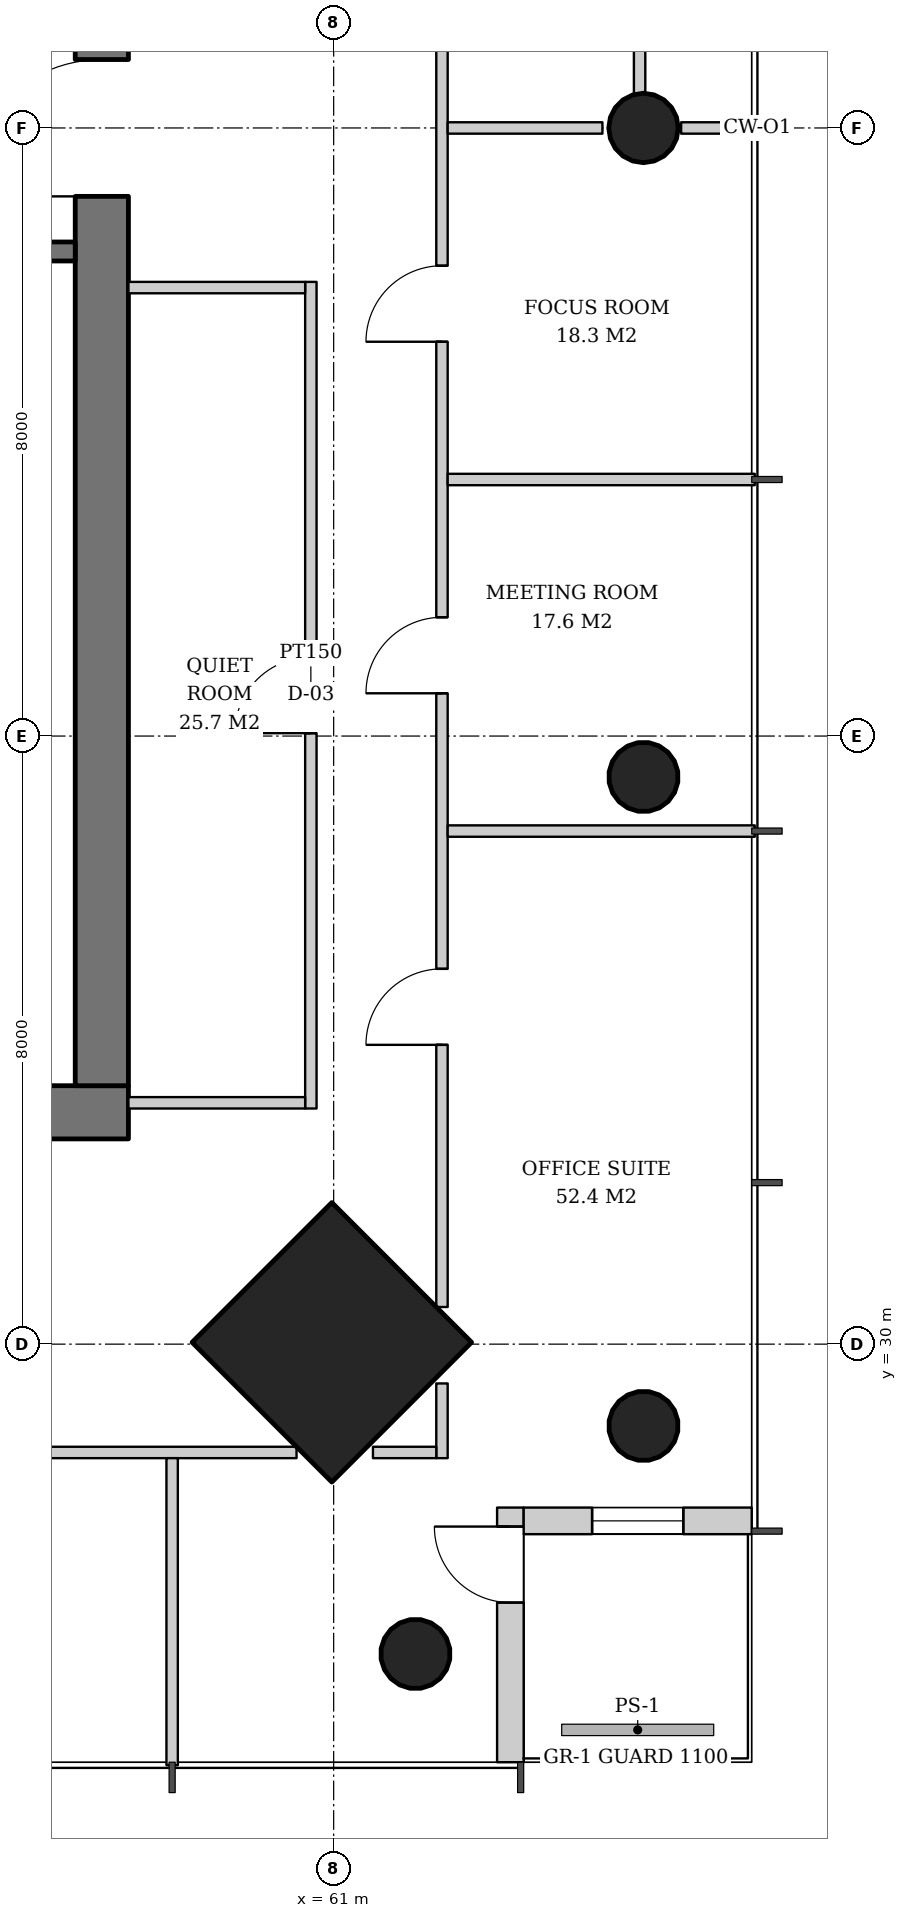
"""IFC4 building model, lengths in metres.
Left out: names, types, materials, properties, quantities, classifications, styles, units other than length and angle.
Written with IfcOpenShell. Run it as: python <this file> out.ifc"""

import sys

from ifc_helpers import new_model, si_unit, direction, frame, frame_2d, origin, origin_2d, place, context, subcontext, project, spatial, rectangle, hollow_circle, extrude, element, fill, save


model = new_model("IFC4")
c1 = context("Model", 3, precision=1e-05, world=origin(), true_north=direction((0.0, 1.0)))
c2 = subcontext(c1, "Body", "Model", "MODEL_VIEW")
j1 = project(units=[si_unit("LENGTHUNIT", "METRE"), si_unit("PLANEANGLEUNIT", "RADIAN")], contexts=[c1])
p1 = place(None, origin())
s1 = spatial("IfcSite", under=j1, at=p1, CompositionType="ELEMENT")
p2 = place(p1, origin())
s2 = spatial("IfcBuilding", under=s1, at=p2, CompositionType="ELEMENT")
p3 = place(p2, frame((0.0, 0.0, 142.6)))
s3 = spatial("IfcBuildingStorey", under=s2, at=p3, CompositionType="ELEMENT", Elevation=142.6)
p4 = place(p3, frame((65.114, 28.886, 0.0), z_axis=(-0.031900153262, 0.031900153262, 0.998981861919), x_axis=(-0.707106781187, -0.707106781187, 0.0)))
e1 = element("IfcColumn", 1, at=p4, inside=s3, PredefinedType="COLUMN", context=c2, shape_type="SweptSolid", body=[
    extrude(hollow_circle(Radius=0.457, WallThickness=0.03, at=origin_2d()), origin(), (0.0, 0.0, 1.0), 3.804),
])
p5 = place(p3, frame((65.114, 37.443, 0.0), z_axis=(-0.031912317206, 0.01598826355, 0.999362786699), x_axis=(-0.447933021895, -0.894067115991, 0.0)))
e2 = element("IfcColumn", 2, at=p5, inside=s3, PredefinedType="COLUMN", context=c2, shape_type="SweptSolid", body=[
    extrude(hollow_circle(Radius=0.457, WallThickness=0.03, at=origin_2d()), origin(), (0.0, 0.0, 1.0), 3.802),
])
p6 = place(p3, frame((65.114, 46.0, 0.0), z_axis=(-0.031916396774, 0.0, 0.999490542035), x_axis=(0.0, -1.0, 0.0)))
e3 = element("IfcColumn", 3, at=p6, inside=s3, PredefinedType="COLUMN", context=c2, shape_type="SweptSolid", body=[
    extrude(hollow_circle(Radius=0.457, WallThickness=0.03, at=origin_2d()), origin(), (0.0, 0.0, 1.0), 3.802),
])
p7 = place(p3, frame((61.014, 29.986, 0.0), z_axis=(-0.031964207655, 0.031964207655, 0.998977766949), x_axis=(-0.707106781187, -0.707106781187, 0.0)))
e4 = element("IfcColumn", 4, at=p7, inside=s3, PredefinedType="COLUMN", context=c2, shape_type="SweptSolid", body=[
    extrude(rectangle(XDim=2.6, YDim=2.6, at=origin_2d()), origin(), (0.0, 0.0, 1.0), 3.804),
])
p8 = place(p3, frame((62.114, 25.886, 0.0), z_axis=(-0.031900153262, 0.031900153262, 0.998981861919), x_axis=(-0.707106781187, -0.707106781187, 0.0)))
e5 = element("IfcColumn", 5, at=p8, inside=s3, PredefinedType="COLUMN", context=c2, shape_type="SweptSolid", body=[
    extrude(hollow_circle(Radius=0.457, WallThickness=0.03, at=origin_2d()), origin(), (0.0, 0.0, 1.0), 3.804),
])
p9 = place(p3, frame((31.7, 33.05, 0.0), z_axis=(0.0, 0.0, 1.0), x_axis=(1.0, 0.0, 0.0)))
e6 = element("IfcWall", 6, at=p9, inside=s3, PredefinedType="SHEAR", context=c2, shape_type="SweptSolid", body=[
    extrude(rectangle(XDim=26.6, YDim=0.7, at=frame_2d((13.3, 0.0))), origin(), (0.0, 0.0, 1.0), 3.8),
])
p10 = place(p9, frame((7.3, 0.0, 0.0)))
e7 = element("IfcOpeningElement", 7, at=p10, cuts=e6, PredefinedType="OPENING", context=c2, shape_type="SweptSolid", body=[
    extrude(rectangle(XDim=1.0, YDim=2.1, at=frame_2d((0.5, 1.05))), frame((0.0, 0.36, 0.0), z_axis=(0.0, -1.0, 0.0), x_axis=(1.0, 0.0, 0.0)), (0.0, 0.0, 1.0), 0.72),
])
p11 = place(p9, frame((18.75, 0.0, 0.0)))
e8 = element("IfcOpeningElement", 8, at=p11, cuts=e6, PredefinedType="OPENING", context=c2, shape_type="SweptSolid", body=[
    extrude(rectangle(XDim=1.0, YDim=2.1, at=frame_2d((0.5, 1.05))), frame((0.0, 0.36, 0.0), z_axis=(0.0, -1.0, 0.0), x_axis=(1.0, 0.0, 0.0)), (0.0, 0.0, 1.0), 0.72),
])
p12 = place(p9, frame((1.85, 0.0, 0.0)))
e9 = element("IfcOpeningElement", 9, at=p12, cuts=e6, PredefinedType="OPENING", context=c2, shape_type="SweptSolid", body=[
    extrude(rectangle(XDim=1.0, YDim=2.1, at=frame_2d((0.5, 1.05))), frame((0.0, 0.36, 0.0), z_axis=(0.0, -1.0, 0.0), x_axis=(1.0, 0.0, 0.0)), (0.0, 0.0, 1.0), 0.72),
])
p13 = place(p9, frame((4.7, 0.0, 0.0)))
e10 = element("IfcOpeningElement", 10, at=p13, cuts=e6, PredefinedType="OPENING", context=c2, shape_type="SweptSolid", body=[
    extrude(rectangle(XDim=1.0, YDim=2.1, at=frame_2d((0.5, 1.05))), frame((0.0, 0.36, 0.0), z_axis=(0.0, -1.0, 0.0), x_axis=(1.0, 0.0, 0.0)), (0.0, 0.0, 1.0), 0.72),
])
p14 = place(p9, frame((12.44, 0.0, 0.0)))
e11 = element("IfcOpeningElement", 11, at=p14, cuts=e6, PredefinedType="OPENING", context=c2, shape_type="SweptSolid", body=[
    extrude(rectangle(XDim=1.0, YDim=2.1, at=frame_2d((0.5, 1.05))), frame((0.0, 0.36, 0.0), z_axis=(0.0, -1.0, 0.0), x_axis=(1.0, 0.0, 0.0)), (0.0, 0.0, 1.0), 0.72),
])
p15 = place(p9, frame((20.644, 0.0, 0.0)))
e12 = element("IfcOpeningElement", 12, at=p15, cuts=e6, PredefinedType="OPENING", context=c2, shape_type="SweptSolid", body=[
    extrude(rectangle(XDim=1.0, YDim=2.1, at=frame_2d((0.5, 1.05))), frame((0.0, 0.36, 0.0), z_axis=(0.0, -1.0, 0.0), x_axis=(1.0, 0.0, 0.0)), (0.0, 0.0, 1.0), 0.72),
])
p16 = place(p9, frame((23.544, 0.0, 0.0)))
e13 = element("IfcOpeningElement", 13, at=p16, cuts=e6, PredefinedType="OPENING", context=c2, shape_type="SweptSolid", body=[
    extrude(rectangle(XDim=1.0, YDim=2.1, at=frame_2d((0.5, 1.05))), frame((0.0, 0.36, 0.0), z_axis=(0.0, -1.0, 0.0), x_axis=(1.0, 0.0, 0.0)), (0.0, 0.0, 1.0), 0.72),
])
p17 = place(p3, frame((57.95, 33.4, 0.0), z_axis=(0.0, 0.0, 1.0), x_axis=(0.0, 1.0, 0.0)))
e14 = element("IfcWall", 14, at=p17, inside=s3, PredefinedType="SHEAR", context=c2, shape_type="SweptSolid", body=[
    extrude(rectangle(XDim=25.2, YDim=0.7, at=frame_2d((12.6, 0.0))), origin(), (0.0, 0.0, 1.0), 3.8),
])
p18 = place(p17, frame((11.7, 0.0, 0.0)))
e15 = element("IfcOpeningElement", 15, at=p18, cuts=e14, PredefinedType="OPENING", context=c2, shape_type="SweptSolid", body=[
    extrude(rectangle(XDim=1.8, YDim=2.4, at=frame_2d((0.9, 1.2))), frame((0.0, 0.36, 0.0), z_axis=(0.0, -1.0, 0.0), x_axis=(1.0, 0.0, 0.0)), (0.0, 0.0, 1.0), 0.72),
])
p19 = place(p3, frame((63.325, 24.5, 0.0), z_axis=(0.0, 0.0, 1.0), x_axis=(0.0, 1.0, 0.0)))
e16 = element("IfcWall", 16, at=p19, inside=s3, PredefinedType="SOLIDWALL", context=c2, shape_type="SweptSolid", body=[
    extrude(rectangle(XDim=3.35, YDim=0.35, at=frame_2d((1.675, 0.0))), origin(), (0.0, 0.0, 1.0), 3.62),
])
p20 = place(p19, frame((2.1, 0.0, 0.0)))
e17 = element("IfcOpeningElement", 17, at=p20, cuts=e16, PredefinedType="OPENING", context=c2, shape_type="SweptSolid", body=[
    extrude(rectangle(XDim=1.0, YDim=2.4, at=frame_2d((0.5, 1.2))), frame((0.0, 0.185, 0.0), z_axis=(0.0, -1.0, 0.0), x_axis=(1.0, 0.0, 0.0)), (0.0, 0.0, 1.0), 0.37),
])
p21 = place(p3, frame((63.5, 27.675, 0.0), z_axis=(0.0, 0.0, 1.0), x_axis=(1.0, 0.0, 0.0)))
e18 = element("IfcWall", 18, at=p21, inside=s3, PredefinedType="SOLIDWALL", context=c2, shape_type="SweptSolid", body=[
    extrude(rectangle(XDim=3.0, YDim=0.35, at=frame_2d((1.5, 0.0))), origin(), (0.0, 0.0, 1.0), 3.62),
])
p22 = place(p21, frame((0.9, 0.0, 0.6)))
e19 = element("IfcOpeningElement", 19, at=p22, cuts=e18, PredefinedType="OPENING", context=c2, shape_type="SweptSolid", body=[
    extrude(rectangle(XDim=1.2, YDim=2.55, at=frame_2d((0.6, 1.275))), frame((0.0, 0.185, 0.0), z_axis=(0.0, -1.0, 0.0), x_axis=(1.0, 0.0, 0.0)), (0.0, 0.0, 1.0), 0.37),
])
p23 = place(p3, frame((54.9, 44.375, 0.0), z_axis=(0.0, 0.0, 1.0), x_axis=(1.0, 0.0, 0.0)))
e20 = element("IfcWall", 20, at=p23, inside=s3, PredefinedType="SOLIDWALL", context=c2, shape_type="SweptSolid", body=[
    extrude(rectangle(XDim=2.7, YDim=0.25, at=frame_2d((1.35, 0.0))), origin(), (0.0, 0.0, 1.0), 3.62),
])
p24 = place(p3, frame((60.7, 33.1, 0.0), z_axis=(0.0, 0.0, 1.0), x_axis=(0.0, 1.0, 0.0)))
e21 = element("IfcWall", 21, at=p24, inside=s3, PredefinedType="PARTITIONING", context=c2, shape_type="SweptSolid", body=[
    extrude(rectangle(XDim=10.875, YDim=0.15, at=frame_2d((5.438, 0.0))), origin(), (0.0, 0.0, 1.0), 2.72),
])
p25 = place(p24, frame((4.938, 0.0, 0.0)))
e22 = element("IfcOpeningElement", 22, at=p25, cuts=e21, PredefinedType="OPENING", context=c2, shape_type="SweptSolid", body=[
    extrude(rectangle(XDim=1.0, YDim=2.1, at=frame_2d((0.5, 1.05))), frame((0.0, 0.085, 0.0), z_axis=(0.0, -1.0, 0.0), x_axis=(1.0, 0.0, 0.0)), (0.0, 0.0, 1.0), 0.17),
])
p26 = place(p3, frame((58.3, 33.175, 0.0), z_axis=(0.0, 0.0, 1.0), x_axis=(1.0, 0.0, 0.0)))
e23 = element("IfcWall", 23, at=p26, inside=s3, PredefinedType="PARTITIONING", context=c2, shape_type="SweptSolid", body=[
    extrude(rectangle(XDim=2.325, YDim=0.15, at=frame_2d((1.163, 0.0))), origin(), (0.0, 0.0, 1.0), 2.72),
])
p27 = place(p3, frame((58.3, 43.9, 0.0), z_axis=(0.0, 0.0, 1.0), x_axis=(1.0, 0.0, 0.0)))
e24 = element("IfcWall", 24, at=p27, inside=s3, PredefinedType="PARTITIONING", context=c2, shape_type="SweptSolid", body=[
    extrude(rectangle(XDim=2.325, YDim=0.15, at=frame_2d((1.163, 0.0))), origin(), (0.0, 0.0, 1.0), 3.62),
])
p28 = place(p3, frame((65.025, 46.457, 0.0), z_axis=(0.0, 0.0, 1.0), x_axis=(0.0, 1.0, 0.0)))
e25 = element("IfcWall", 25, at=p28, inside=s3, PredefinedType="PARTITIONING", context=c2, shape_type="SweptSolid", body=[
    extrude(rectangle(XDim=4.093, YDim=0.15, at=frame_2d((2.046, 0.0))), origin(), (0.0, 0.0, 1.0), 2.82),
])
p29 = place(p3, frame((62.425, 28.5, 0.0), z_axis=(0.0, 0.0, 1.0), x_axis=(0.0, 1.0, 0.0)))
e26 = element("IfcWall", 26, at=p29, inside=s3, PredefinedType="PARTITIONING", context=c2, shape_type="SweptSolid", body=[
    extrude(rectangle(XDim=0.983, YDim=0.15, at=frame_2d((0.491, 0.0))), origin(), (0.0, 0.0, 1.0), 3.32),
])
p30 = place(p3, frame((62.425, 30.489, 0.0), z_axis=(0.0, 0.0, 1.0), x_axis=(0.0, 1.0, 0.0)))
e27 = element("IfcWall", 27, at=p30, inside=s3, PredefinedType="PARTITIONING", context=c2, shape_type="SweptSolid", body=[
    extrude(rectangle(XDim=31.023, YDim=0.15, at=frame_2d((15.511, 0.0))), origin(), (0.0, 0.0, 1.0), 2.72),
])
p31 = place(p30, frame((3.449, 0.0, 0.0)))
e28 = element("IfcOpeningElement", 28, at=p31, cuts=e27, PredefinedType="OPENING", context=c2, shape_type="SweptSolid", body=[
    extrude(rectangle(XDim=1.0, YDim=2.1, at=frame_2d((0.5, 1.05))), frame((0.0, 0.085, 0.0), z_axis=(0.0, -1.0, 0.0), x_axis=(1.0, 0.0, 0.0)), (0.0, 0.0, 1.0), 0.17),
])
p32 = place(p30, frame((8.074, 0.0, 0.0)))
e29 = element("IfcOpeningElement", 29, at=p32, cuts=e27, PredefinedType="OPENING", context=c2, shape_type="SweptSolid", body=[
    extrude(rectangle(XDim=1.0, YDim=2.1, at=frame_2d((0.5, 1.05))), frame((0.0, 0.085, 0.0), z_axis=(0.0, -1.0, 0.0), x_axis=(1.0, 0.0, 0.0)), (0.0, 0.0, 1.0), 0.17),
])
p33 = place(p30, frame((12.699, 0.0, 0.0)))
e30 = element("IfcOpeningElement", 30, at=p33, cuts=e27, PredefinedType="OPENING", context=c2, shape_type="SweptSolid", body=[
    extrude(rectangle(XDim=1.0, YDim=2.1, at=frame_2d((0.5, 1.05))), frame((0.0, 0.085, 0.0), z_axis=(0.0, -1.0, 0.0), x_axis=(1.0, 0.0, 0.0)), (0.0, 0.0, 1.0), 0.17),
])
p34 = place(p30, frame((17.324, 0.0, 0.0)))
e31 = element("IfcOpeningElement", 31, at=p34, cuts=e27, PredefinedType="OPENING", context=c2, shape_type="SweptSolid", body=[
    extrude(rectangle(XDim=1.0, YDim=2.1, at=frame_2d((0.5, 1.05))), frame((0.0, 0.085, 0.0), z_axis=(0.0, -1.0, 0.0), x_axis=(1.0, 0.0, 0.0)), (0.0, 0.0, 1.0), 0.17),
])
p35 = place(p30, frame((21.949, 0.0, 0.0)))
e32 = element("IfcOpeningElement", 32, at=p35, cuts=e27, PredefinedType="OPENING", context=c2, shape_type="SweptSolid", body=[
    extrude(rectangle(XDim=1.0, YDim=2.1, at=frame_2d((0.5, 1.05))), frame((0.0, 0.085, 0.0), z_axis=(0.0, -1.0, 0.0), x_axis=(1.0, 0.0, 0.0)), (0.0, 0.0, 1.0), 0.17),
])
p36 = place(p30, frame((26.574, 0.0, 0.0)))
e33 = element("IfcOpeningElement", 33, at=p36, cuts=e27, PredefinedType="OPENING", context=c2, shape_type="SweptSolid", body=[
    extrude(rectangle(XDim=1.0, YDim=2.1, at=frame_2d((0.5, 1.05))), frame((0.0, 0.085, 0.0), z_axis=(0.0, -1.0, 0.0), x_axis=(1.0, 0.0, 0.0)), (0.0, 0.0, 1.0), 0.17),
])
for number, where, z_axis, x_axis in (
    (34, (62.5, 36.75, 0.0), (0.0, 0.0, 1.0), (1.0, 0.0, 0.0)),
    (35, (62.5, 41.375, 0.0), (0.0, 0.0, 1.0), (1.0, 0.0, 0.0)),
):
    element("IfcWall", number, at=place(p3, frame(where, z_axis=z_axis, x_axis=x_axis)), inside=s3, PredefinedType="PARTITIONING", context=c2, shape_type="SweptSolid", body=[
        extrude(rectangle(XDim=4.04, YDim=0.15, at=frame_2d((2.02, 0.0))), origin(), (0.0, 0.0, 1.0), 2.82),
    ])
p37 = place(p3, frame((62.5, 46.0, 0.0), z_axis=(0.0, 0.0, 1.0), x_axis=(1.0, 0.0, 0.0)))
e36 = element("IfcWall", 36, at=p37, inside=s3, PredefinedType="PARTITIONING", context=c2, shape_type="SweptSolid", body=[
    extrude(rectangle(XDim=2.036, YDim=0.15, at=frame_2d((1.018, 0.0))), origin(), (0.0, 0.0, 1.0), 3.62),
])
p38 = place(p3, frame((65.571, 46.0, 0.0), z_axis=(0.0, 0.0, 1.0), x_axis=(1.0, 0.0, 0.0)))
e37 = element("IfcWall", 37, at=p38, inside=s3, PredefinedType="PARTITIONING", context=c2, shape_type="SweptSolid", body=[
    extrude(rectangle(XDim=0.969, YDim=0.15, at=frame_2d((0.484, 0.0))), origin(), (0.0, 0.0, 1.0), 3.62),
])
p39 = place(p3, frame((29.489, 28.575, 0.0), z_axis=(0.0, 0.0, 1.0), x_axis=(1.0, 0.0, 0.0)))
e38 = element("IfcWall", 38, at=p39, inside=s3, PredefinedType="PARTITIONING", context=c2, shape_type="SweptSolid", body=[
    extrude(rectangle(XDim=31.023, YDim=0.15, at=frame_2d((15.511, 0.0))), origin(), (0.0, 0.0, 1.0), 2.72),
])
p40 = place(p39, frame((3.449, 0.0, 0.0)))
e39 = element("IfcOpeningElement", 39, at=p40, cuts=e38, PredefinedType="OPENING", context=c2, shape_type="SweptSolid", body=[
    extrude(rectangle(XDim=1.0, YDim=2.1, at=frame_2d((0.5, 1.05))), frame((0.0, 0.085, 0.0), z_axis=(0.0, -1.0, 0.0), x_axis=(1.0, 0.0, 0.0)), (0.0, 0.0, 1.0), 0.17),
])
p41 = place(p39, frame((8.074, 0.0, 0.0)))
e40 = element("IfcOpeningElement", 40, at=p41, cuts=e38, PredefinedType="OPENING", context=c2, shape_type="SweptSolid", body=[
    extrude(rectangle(XDim=1.0, YDim=2.1, at=frame_2d((0.5, 1.05))), frame((0.0, 0.085, 0.0), z_axis=(0.0, -1.0, 0.0), x_axis=(1.0, 0.0, 0.0)), (0.0, 0.0, 1.0), 0.17),
])
p42 = place(p39, frame((12.699, 0.0, 0.0)))
e41 = element("IfcOpeningElement", 41, at=p42, cuts=e38, PredefinedType="OPENING", context=c2, shape_type="SweptSolid", body=[
    extrude(rectangle(XDim=1.0, YDim=2.1, at=frame_2d((0.5, 1.05))), frame((0.0, 0.085, 0.0), z_axis=(0.0, -1.0, 0.0), x_axis=(1.0, 0.0, 0.0)), (0.0, 0.0, 1.0), 0.17),
])
p43 = place(p39, frame((17.324, 0.0, 0.0)))
e42 = element("IfcOpeningElement", 42, at=p43, cuts=e38, PredefinedType="OPENING", context=c2, shape_type="SweptSolid", body=[
    extrude(rectangle(XDim=1.0, YDim=2.1, at=frame_2d((0.5, 1.05))), frame((0.0, 0.085, 0.0), z_axis=(0.0, -1.0, 0.0), x_axis=(1.0, 0.0, 0.0)), (0.0, 0.0, 1.0), 0.17),
])
p44 = place(p39, frame((21.949, 0.0, 0.0)))
e43 = element("IfcOpeningElement", 43, at=p44, cuts=e38, PredefinedType="OPENING", context=c2, shape_type="SweptSolid", body=[
    extrude(rectangle(XDim=1.0, YDim=2.1, at=frame_2d((0.5, 1.05))), frame((0.0, 0.085, 0.0), z_axis=(0.0, -1.0, 0.0), x_axis=(1.0, 0.0, 0.0)), (0.0, 0.0, 1.0), 0.17),
])
p45 = place(p39, frame((26.574, 0.0, 0.0)))
e44 = element("IfcOpeningElement", 44, at=p45, cuts=e38, PredefinedType="OPENING", context=c2, shape_type="SweptSolid", body=[
    extrude(rectangle(XDim=1.0, YDim=2.1, at=frame_2d((0.5, 1.05))), frame((0.0, 0.085, 0.0), z_axis=(0.0, -1.0, 0.0), x_axis=(1.0, 0.0, 0.0)), (0.0, 0.0, 1.0), 0.17),
])
p46 = place(p3, frame((61.517, 28.575, 0.0), z_axis=(0.0, 0.0, 1.0), x_axis=(1.0, 0.0, 0.0)))
e45 = element("IfcWall", 45, at=p46, inside=s3, PredefinedType="PARTITIONING", context=c2, shape_type="SweptSolid", body=[
    extrude(rectangle(XDim=0.833, YDim=0.15, at=frame_2d((0.417, 0.0))), origin(), (0.0, 0.0, 1.0), 3.32),
])
p47 = place(p3, frame((58.875, 28.5, 0.0), z_axis=(0.0, 0.0, 1.0), x_axis=(0.0, -1.0, 0.0)))
e46 = element("IfcWall", 46, at=p47, inside=s3, PredefinedType="PARTITIONING", context=c2, shape_type="SweptSolid", body=[
    extrude(rectangle(XDim=4.04, YDim=0.15, at=frame_2d((2.02, 0.0))), origin(), (0.0, 0.0, 1.0), 2.82),
])
p48 = place(p20, origin())
e47 = element("IfcDoor", 47, at=p48, inside=s3, OperationType="SINGLE_SWING_RIGHT", PredefinedType="DOOR", context=c2, shape_type="SweptSolid", body=[
    extrude(rectangle(XDim=1.0, YDim=2.4, at=frame_2d((0.5, 1.2))), frame((0.0, 0.025, 0.0), z_axis=(0.0, -1.0, 0.0), x_axis=(1.0, 0.0, 0.0)), (0.0, 0.0, 1.0), 0.05),
])
fill(e17, e47)
p49 = place(p22, origin())
e48 = element("IfcWindow", 48, at=p49, inside=s3, PartitioningType="SINGLE_PANEL", PredefinedType="WINDOW", context=c2, shape_type="SweptSolid", body=[
    extrude(rectangle(XDim=1.2, YDim=2.55, at=frame_2d((0.6, 1.275))), frame((0.0, 0.03, 0.0), z_axis=(0.0, -1.0, 0.0), x_axis=(1.0, 0.0, 0.0)), (0.0, 0.0, 1.0), 0.06),
])
fill(e19, e48)
p50 = place(p18, origin())
e49 = element("IfcDoor", 49, at=p50, inside=s3, OperationType="DOUBLE_DOOR_SINGLE_SWING", PredefinedType="DOOR", context=c2, shape_type="SweptSolid", body=[
    extrude(rectangle(XDim=1.8, YDim=2.4, at=frame_2d((0.9, 1.2))), frame((0.0, 0.025, 0.0), z_axis=(0.0, -1.0, 0.0), x_axis=(1.0, 0.0, 0.0)), (0.0, 0.0, 1.0), 0.05),
])
fill(e15, e49)
p51 = place(p25, origin())
e50 = element("IfcDoor", 50, at=p51, inside=s3, OperationType="SINGLE_SWING_LEFT", PredefinedType="DOOR", context=c2, shape_type="SweptSolid", body=[
    extrude(rectangle(XDim=1.0, YDim=2.1, at=frame_2d((0.5, 1.05))), frame((0.0, 0.025, 0.0), z_axis=(0.0, -1.0, 0.0), x_axis=(1.0, 0.0, 0.0)), (0.0, 0.0, 1.0), 0.05),
])
fill(e22, e50)
p52 = place(p31, origin())
e51 = element("IfcDoor", 51, at=p52, inside=s3, OperationType="SINGLE_SWING_LEFT", PredefinedType="DOOR", context=c2, shape_type="SweptSolid", body=[
    extrude(rectangle(XDim=1.0, YDim=2.1, at=frame_2d((0.5, 1.05))), frame((0.0, 0.025, 0.0), z_axis=(0.0, -1.0, 0.0), x_axis=(1.0, 0.0, 0.0)), (0.0, 0.0, 1.0), 0.05),
])
fill(e28, e51)
p53 = place(p32, origin())
e52 = element("IfcDoor", 52, at=p53, inside=s3, OperationType="SINGLE_SWING_LEFT", PredefinedType="DOOR", context=c2, shape_type="SweptSolid", body=[
    extrude(rectangle(XDim=1.0, YDim=2.1, at=frame_2d((0.5, 1.05))), frame((0.0, 0.025, 0.0), z_axis=(0.0, -1.0, 0.0), x_axis=(1.0, 0.0, 0.0)), (0.0, 0.0, 1.0), 0.05),
])
fill(e29, e52)
p54 = place(p33, origin())
e53 = element("IfcDoor", 53, at=p54, inside=s3, OperationType="SINGLE_SWING_LEFT", PredefinedType="DOOR", context=c2, shape_type="SweptSolid", body=[
    extrude(rectangle(XDim=1.0, YDim=2.1, at=frame_2d((0.5, 1.05))), frame((0.0, 0.025, 0.0), z_axis=(0.0, -1.0, 0.0), x_axis=(1.0, 0.0, 0.0)), (0.0, 0.0, 1.0), 0.05),
])
fill(e30, e53)
save(model, sys.argv[1])
